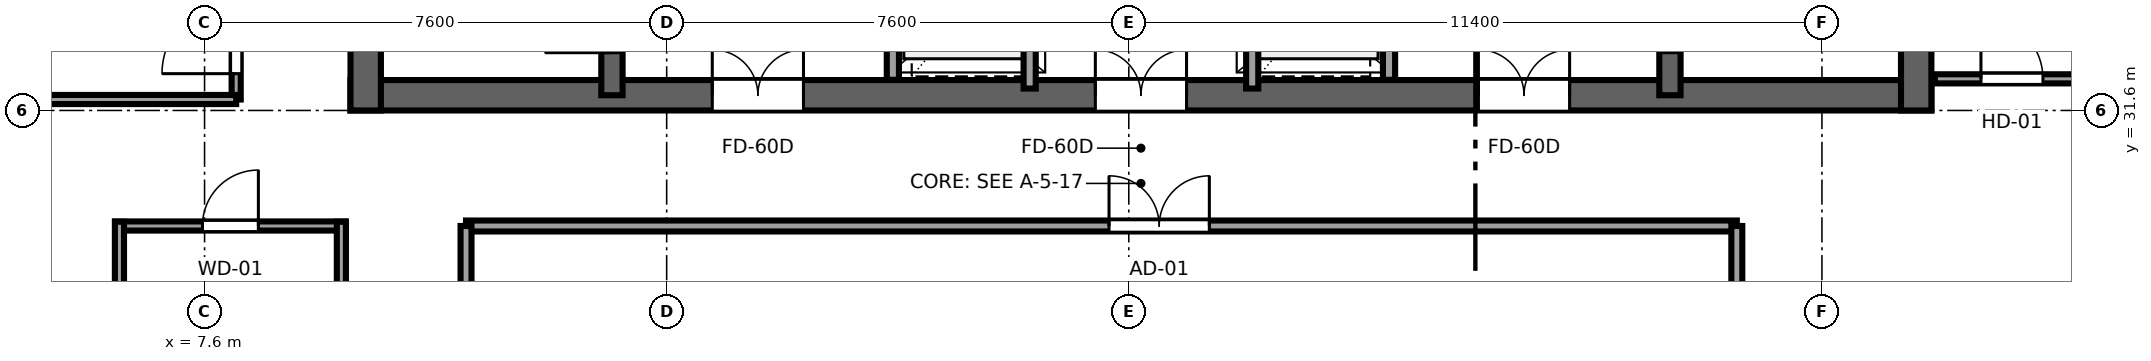
"""IFC4 building model, lengths in metres.
Left out: names, types, materials, properties, quantities, classifications, styles, units other than length and angle.
Written with IfcOpenShell. Run it as: python <this file> out.ifc"""

import sys

from ifc_helpers import new_model, si_unit, direction, frame, frame_2d, origin, place, context, subcontext, project, spatial, rectangle, extrude, source, transform, mapped, element, fill, save


model = new_model("IFC4")
c1 = context("Model", 3, precision=1e-05, world=origin(), true_north=direction((0.0, 1.0)))
c2 = subcontext(c1, "Body", "Model", "MODEL_VIEW")
j1 = project(units=[si_unit("LENGTHUNIT", "METRE"), si_unit("PLANEANGLEUNIT", "RADIAN")], contexts=[c1])
p1 = place(None, origin())
s1 = spatial("IfcSite", under=j1, at=p1, CompositionType="ELEMENT")
p2 = place(p1, origin())
s2 = spatial("IfcBuilding", under=s1, at=p2, CompositionType="ELEMENT")
p3 = place(p2, frame((0.0, 0.0, 266.5)))
s3 = spatial("IfcBuildingStorey", under=s2, at=p3, CompositionType="ELEMENT", Elevation=266.5)
p4 = place(p3, frame((10.0, 31.85, 0.0), z_axis=(0.0, 0.0, 1.0), x_axis=(1.0, 0.0, 0.0)))
e1 = element("IfcWall", 1, at=p4, inside=s3, PredefinedType="SHEAR", context=c2, shape_type="SweptSolid", body=[
    extrude(rectangle(XDim=26.0, YDim=0.5, at=frame_2d((13.0, 0.0))), origin(), (0.0, 0.0, 1.0), 3.55),
])
p5 = place(p4, frame((7.45, 0.0, 0.0), z_axis=(0.0, 0.0, 1.0), x_axis=(-1.0, 0.0, 0.0)))
e2 = element("IfcOpeningElement", 2, at=p5, cuts=e1, PredefinedType="OPENING", context=c2, shape_type="SweptSolid", body=[
    extrude(rectangle(XDim=1.5, YDim=2.04, at=frame_2d((0.75, 1.02))), frame((0.0, 0.26, 0.0), z_axis=(0.0, -1.0, 0.0), x_axis=(1.0, 0.0, 0.0)), (0.0, 0.0, 1.0), 0.52),
])
p6 = place(p4, frame((13.75, 0.0, 0.0), z_axis=(0.0, 0.0, 1.0), x_axis=(-1.0, 0.0, 0.0)))
e3 = element("IfcOpeningElement", 3, at=p6, cuts=e1, PredefinedType="OPENING", context=c2, shape_type="SweptSolid", body=[
    extrude(rectangle(XDim=1.5, YDim=2.04, at=frame_2d((0.75, 1.02))), frame((0.0, 0.26, 0.0), z_axis=(0.0, -1.0, 0.0), x_axis=(1.0, 0.0, 0.0)), (0.0, 0.0, 1.0), 0.52),
])
p7 = place(p4, frame((20.05, 0.0, 0.0), z_axis=(0.0, 0.0, 1.0), x_axis=(-1.0, 0.0, 0.0)))
e4 = element("IfcOpeningElement", 4, at=p7, cuts=e1, PredefinedType="OPENING", context=c2, shape_type="SweptSolid", body=[
    extrude(rectangle(XDim=1.5, YDim=2.04, at=frame_2d((0.75, 1.02))), frame((0.0, 0.26, 0.0), z_axis=(0.0, -1.0, 0.0), x_axis=(1.0, 0.0, 0.0)), (0.0, 0.0, 1.0), 0.52),
])
for number, where, z_axis, x_axis in (
    (5, (10.25, 31.6, 0.0), (0.0, 0.0, 1.0), (0.0, 1.0, 0.0)),
    (6, (35.75, 31.6, 0.0), (0.0, 0.0, 1.0), (0.0, 1.0, 0.0)),
):
    element("IfcWall", number, at=place(p3, frame(where, z_axis=z_axis, x_axis=x_axis)), inside=s3, PredefinedType="SHEAR", context=c2, shape_type="SweptSolid", body=[
        extrude(rectangle(XDim=13.6, YDim=0.5, at=frame_2d((6.8, 0.0))), origin(), (0.0, 0.0, 1.0), 3.55),
    ])
p8 = place(p3, frame((14.3, 31.85, 0.0), z_axis=(0.0, 0.0, 1.0), x_axis=(0.0, 1.0, 0.0)))
e7 = element("IfcWall", 7, at=p8, inside=s3, PredefinedType="SHEAR", context=c2, shape_type="SweptSolid", body=[
    extrude(rectangle(XDim=13.1, YDim=0.35, at=frame_2d((6.55, 0.0))), origin(), (0.0, 0.0, 1.0), 3.55),
])
p9 = place(p8, frame((0.7, 0.0, 0.0)))
e8 = element("IfcOpeningElement", 8, at=p9, cuts=e7, PredefinedType="OPENING", context=c2, shape_type="SweptSolid", body=[
    extrude(rectangle(XDim=1.1, YDim=2.12, at=frame_2d((0.55, 1.06))), frame((0.0, 0.185, 0.0), z_axis=(0.0, -1.0, 0.0), x_axis=(1.0, 0.0, 0.0)), (0.0, 0.0, 1.0), 0.37),
])
p10 = place(p3, frame((31.7, 31.85, 0.0), z_axis=(0.0, 0.0, 1.0), x_axis=(0.0, 1.0, 0.0)))
e9 = element("IfcWall", 9, at=p10, inside=s3, PredefinedType="SHEAR", context=c2, shape_type="SweptSolid", body=[
    extrude(rectangle(XDim=13.1, YDim=0.35, at=frame_2d((6.55, 0.0))), origin(), (0.0, 0.0, 1.0), 3.55),
])
p11 = place(p10, frame((1.8, 0.0, 0.0), z_axis=(0.0, 0.0, 1.0), x_axis=(-1.0, 0.0, 0.0)))
e10 = element("IfcOpeningElement", 10, at=p11, cuts=e9, PredefinedType="OPENING", context=c2, shape_type="SweptSolid", body=[
    extrude(rectangle(XDim=1.1, YDim=2.12, at=frame_2d((0.55, 1.06))), frame((0.0, 0.185, 0.0), z_axis=(0.0, -1.0, 0.0), x_axis=(1.0, 0.0, 0.0)), (0.0, 0.0, 1.0), 0.37),
])
for number, where, z_axis, x_axis in (
    (11, (18.92, 32.104, 0.0), (0.0, 0.0, 1.0), (0.0, 1.0, 0.0)),
    (12, (27.08, 32.104, 0.0), (0.0, 0.0, 1.0), (0.0, 1.0, 0.0)),
):
    element("IfcWall", number, at=place(p3, frame(where, z_axis=z_axis, x_axis=x_axis)), inside=s3, PredefinedType="SOLIDWALL", context=c2, shape_type="SweptSolid", body=[
        extrude(rectangle(XDim=4.046, YDim=0.2, at=frame_2d((2.023, 0.0))), origin(), (0.0, 0.0, 1.0), 3.25),
    ])
p12 = place(p3, frame((21.17, 31.96, 0.0), z_axis=(0.0, 0.0, 1.0), x_axis=(0.0, 1.0, 0.0)))
e13 = element("IfcWall", 13, at=p12, inside=s3, PredefinedType="SOLIDWALL", context=c2, shape_type="SweptSolid", body=[
    extrude(rectangle(XDim=5.08, YDim=0.2, at=frame_2d((2.54, 0.0))), origin(), (0.0, 0.0, 1.0), 3.25),
])
p13 = place(p12, frame((0.74, 0.0, 0.0)))
e14 = element("IfcOpeningElement", 14, at=p13, cuts=e13, PredefinedType="OPENING", context=c2, shape_type="SweptSolid", body=[
    extrude(rectangle(XDim=1.1, YDim=2.12, at=frame_2d((0.55, 1.06))), frame((0.0, 0.11, 0.0), z_axis=(0.0, -1.0, 0.0), x_axis=(1.0, 0.0, 0.0)), (0.0, 0.0, 1.0), 0.22),
])
p14 = place(p12, frame((3.24, 0.0, 0.0)))
e15 = element("IfcOpeningElement", 15, at=p14, cuts=e13, PredefinedType="OPENING", context=c2, shape_type="SweptSolid", body=[
    extrude(rectangle(XDim=1.1, YDim=2.12, at=frame_2d((0.55, 1.06))), frame((0.0, 0.11, 0.0), z_axis=(0.0, -1.0, 0.0), x_axis=(1.0, 0.0, 0.0)), (0.0, 0.0, 1.0), 0.22),
])
p15 = place(p3, frame((24.83, 31.96, 0.0), z_axis=(0.0, 0.0, 1.0), x_axis=(0.0, 1.0, 0.0)))
e16 = element("IfcWall", 16, at=p15, inside=s3, PredefinedType="SOLIDWALL", context=c2, shape_type="SweptSolid", body=[
    extrude(rectangle(XDim=5.08, YDim=0.2, at=frame_2d((2.54, 0.0))), origin(), (0.0, 0.0, 1.0), 3.25),
])
p16 = place(p15, frame((0.74, 0.0, 0.0)))
e17 = element("IfcOpeningElement", 17, at=p16, cuts=e16, PredefinedType="OPENING", context=c2, shape_type="SweptSolid", body=[
    extrude(rectangle(XDim=1.1, YDim=2.12, at=frame_2d((0.55, 1.06))), frame((0.0, 0.11, 0.0), z_axis=(0.0, -1.0, 0.0), x_axis=(1.0, 0.0, 0.0)), (0.0, 0.0, 1.0), 0.22),
])
p17 = place(p15, frame((3.24, 0.0, 0.0)))
e18 = element("IfcOpeningElement", 18, at=p17, cuts=e16, PredefinedType="OPENING", context=c2, shape_type="SweptSolid", body=[
    extrude(rectangle(XDim=1.1, YDim=2.12, at=frame_2d((0.55, 1.06))), frame((0.0, 0.11, 0.0), z_axis=(0.0, -1.0, 0.0), x_axis=(1.0, 0.0, 0.0)), (0.0, 0.0, 1.0), 0.22),
])
p18 = place(p3, frame((11.9, 29.7, 0.0), z_axis=(0.0, 0.0, 1.0), x_axis=(1.0, 0.0, 0.0)))
e19 = element("IfcWall", 19, at=p18, inside=s3, PredefinedType="PARTITIONING", context=c2, shape_type="SweptSolid", body=[
    extrude(rectangle(XDim=20.9, YDim=0.18, at=frame_2d((10.45, 0.0))), origin(), (0.0, 0.0, 1.0), 3.25),
])
p19 = place(p18, frame((10.575, 0.0, 0.0)))
e20 = element("IfcOpeningElement", 20, at=p19, cuts=e19, PredefinedType="OPENING", context=c2, shape_type="SweptSolid", body=[
    extrude(rectangle(XDim=1.65, YDim=2.15, at=frame_2d((0.825, 1.075))), frame((0.0, 0.1, 0.0), z_axis=(0.0, -1.0, 0.0), x_axis=(1.0, 0.0, 0.0)), (0.0, 0.0, 1.0), 0.2),
])
p20 = place(p3, frame((11.9, 26.2, 0.0), z_axis=(0.0, 0.0, 1.0), x_axis=(0.0, 1.0, 0.0)))
e21 = element("IfcWall", 21, at=p20, inside=s3, PredefinedType="PARTITIONING", context=c2, shape_type="SweptSolid", body=[
    extrude(rectangle(XDim=3.5, YDim=0.18, at=frame_2d((1.75, 0.0))), origin(), (0.0, 0.0, 1.0), 3.25),
])
p21 = place(p3, frame((32.8, 26.2, 0.0), z_axis=(0.0, 0.0, 1.0), x_axis=(0.0, 1.0, 0.0)))
e22 = element("IfcWall", 22, at=p21, inside=s3, PredefinedType="PARTITIONING", context=c2, shape_type="SweptSolid", body=[
    extrude(rectangle(XDim=3.5, YDim=0.18, at=frame_2d((1.75, 0.0))), origin(), (0.0, 0.0, 1.0), 2.04),
])
p22 = place(p3, frame((6.13, 29.7, 0.0), z_axis=(0.0, 0.0, 1.0), x_axis=(1.0, 0.0, 0.0)))
e23 = element("IfcWall", 23, at=p22, inside=s3, PredefinedType="PARTITIONING", context=c2, shape_type="SweptSolid", body=[
    extrude(rectangle(XDim=3.79, YDim=0.15, at=frame_2d((1.895, 0.0))), origin(), (0.0, 0.0, 1.0), 3.25),
])
p23 = place(p22, frame((1.435, 0.0, 0.0)))
e24 = element("IfcOpeningElement", 24, at=p23, cuts=e23, PredefinedType="OPENING", context=c2, shape_type="SweptSolid", body=[
    extrude(rectangle(XDim=0.92, YDim=2.01, at=frame_2d((0.46, 1.005))), frame((0.0, 0.085, 0.0), z_axis=(0.0, -1.0, 0.0), x_axis=(1.0, 0.0, 0.0)), (0.0, 0.0, 1.0), 0.17),
])
for number, where, z_axis, x_axis in (
    (25, (6.2, 26.43, 0.0), (0.0, 0.0, 1.0), (0.0, 1.0, 0.0)),
    (26, (9.85, 26.43, 0.0), (0.0, 0.0, 1.0), (0.0, 1.0, 0.0)),
):
    element("IfcWall", number, at=place(p3, frame(where, z_axis=z_axis, x_axis=x_axis)), inside=s3, PredefinedType="PARTITIONING", context=c2, shape_type="SweptSolid", body=[
        extrude(rectangle(XDim=3.34, YDim=0.15, at=frame_2d((1.67, 0.0))), origin(), (0.0, 0.0, 1.0), 3.25),
    ])
p24 = place(p3, frame((8.12, 31.78, 0.0), z_axis=(0.0, 0.0, 1.0), x_axis=(0.0, 1.0, 0.0)))
e27 = element("IfcWall", 27, at=p24, inside=s3, PredefinedType="PARTITIONING", context=c2, shape_type="SweptSolid", body=[
    extrude(rectangle(XDim=4.01, YDim=0.15, at=frame_2d((2.005, 0.0))), origin(), (0.0, 0.0, 1.0), 3.25),
])
p25 = place(p24, frame((0.425, 0.0, 0.0)))
e28 = element("IfcOpeningElement", 28, at=p25, cuts=e27, PredefinedType="OPENING", context=c2, shape_type="SweptSolid", body=[
    extrude(rectangle(XDim=1.22, YDim=2.08, at=frame_2d((0.61, 1.04))), frame((0.0, 0.085, 0.0), z_axis=(0.0, -1.0, 0.0), x_axis=(1.0, 0.0, 0.0)), (0.0, 0.0, 1.0), 0.17),
])
p26 = place(p3, frame((3.005, 31.78, 0.0), z_axis=(0.0, 0.0, 1.0), x_axis=(1.0, 0.0, 0.0)))
e29 = element("IfcWall", 29, at=p26, inside=s3, PredefinedType="PARTITIONING", context=c2, shape_type="SweptSolid", body=[
    extrude(rectangle(XDim=5.115, YDim=0.15, at=frame_2d((2.558, 0.0))), origin(), (0.0, 0.0, 1.0), 3.25),
])
p27 = place(p3, frame((36.055, 32.12, 0.0), z_axis=(0.0, 0.0, 1.0), x_axis=(1.0, 0.0, 0.0)))
e30 = element("IfcWall", 30, at=p27, inside=s3, PredefinedType="PARTITIONING", context=c2, shape_type="SweptSolid", body=[
    extrude(rectangle(XDim=2.54, YDim=0.15, at=frame_2d((1.27, 0.0))), origin(), (0.0, 0.0, 1.0), 3.25),
])
p28 = place(p27, frame((0.76, 0.0, 0.0)))
e31 = element("IfcOpeningElement", 31, at=p28, cuts=e30, PredefinedType="OPENING", context=c2, shape_type="SweptSolid", body=[
    extrude(rectangle(XDim=1.02, YDim=2.03, at=frame_2d((0.51, 1.015))), frame((0.0, 0.085, 0.0), z_axis=(0.0, -1.0, 0.0), x_axis=(1.0, 0.0, 0.0)), (0.0, 0.0, 1.0), 0.17),
])
m1 = source(origin(), c2, "Body", "SweptSolid", [
    extrude(rectangle(XDim=1.1, YDim=2.12, at=frame_2d((0.55, 1.06))), frame((0.0, 0.025, 0.0), z_axis=(0.0, -1.0, 0.0), x_axis=(1.0, 0.0, 0.0)), (0.0, 0.0, 1.0), 0.05),
])
p29 = place(p9, origin())
e32 = element("IfcDoor", 32, at=p29, inside=s3, OperationType="SINGLE_SWING_LEFT", PredefinedType="DOOR", context=c2, shape_type="MappedRepresentation", body=[
    mapped(m1, transform((0.0, 0.0, 0.0), x_axis=(1.0, 0.0, 0.0), y_axis=(0.0, 1.0, 0.0), z_axis=(0.0, 0.0, 1.0), scale=1.0)),
])
fill(e8, e32)
p30 = place(p11, origin())
e33 = element("IfcDoor", 33, at=p30, inside=s3, OperationType="SINGLE_SWING_RIGHT", PredefinedType="DOOR", context=c2, shape_type="MappedRepresentation", body=[
    mapped(m1, transform((0.0, 0.0, 0.0), x_axis=(1.0, 0.0, 0.0), y_axis=(0.0, 1.0, 0.0), z_axis=(0.0, 0.0, 1.0), scale=1.0)),
])
fill(e10, e33)
m2 = source(origin(), c2, "Body", "SweptSolid", [
    extrude(rectangle(XDim=1.5, YDim=2.04, at=frame_2d((0.75, 1.02))), frame((0.0, 0.025, 0.0), z_axis=(0.0, -1.0, 0.0), x_axis=(1.0, 0.0, 0.0)), (0.0, 0.0, 1.0), 0.05),
])
p31 = place(p5, origin())
e34 = element("IfcDoor", 34, at=p31, inside=s3, OperationType="DOUBLE_DOOR_SINGLE_SWING", PredefinedType="DOOR", context=c2, shape_type="MappedRepresentation", body=[
    mapped(m2, transform((0.0, 0.0, 0.0), x_axis=(1.0, 0.0, 0.0), y_axis=(0.0, 1.0, 0.0), z_axis=(0.0, 0.0, 1.0), scale=1.0)),
])
fill(e2, e34)
p32 = place(p6, origin())
e35 = element("IfcDoor", 35, at=p32, inside=s3, OperationType="DOUBLE_DOOR_SINGLE_SWING", PredefinedType="DOOR", context=c2, shape_type="MappedRepresentation", body=[
    mapped(m2, transform((0.0, 0.0, 0.0), x_axis=(1.0, 0.0, 0.0), y_axis=(0.0, 1.0, 0.0), z_axis=(0.0, 0.0, 1.0), scale=1.0)),
])
fill(e3, e35)
p33 = place(p7, origin())
e36 = element("IfcDoor", 36, at=p33, inside=s3, OperationType="DOUBLE_DOOR_SINGLE_SWING", PredefinedType="DOOR", context=c2, shape_type="MappedRepresentation", body=[
    mapped(m2, transform((0.0, 0.0, 0.0), x_axis=(1.0, 0.0, 0.0), y_axis=(0.0, 1.0, 0.0), z_axis=(0.0, 0.0, 1.0), scale=1.0)),
])
fill(e4, e36)
m3 = source(origin(), c2, "Body", "SweptSolid", [
    extrude(rectangle(XDim=1.65, YDim=2.15, at=frame_2d((0.825, 1.075))), frame((0.0, 0.025, 0.0), z_axis=(0.0, -1.0, 0.0), x_axis=(1.0, 0.0, 0.0)), (0.0, 0.0, 1.0), 0.05),
])
p34 = place(p19, origin())
e37 = element("IfcDoor", 37, at=p34, inside=s3, OperationType="DOUBLE_DOOR_SINGLE_SWING", PredefinedType="DOOR", context=c2, shape_type="MappedRepresentation", body=[
    mapped(m3, transform((0.0, 0.0, 0.0), x_axis=(1.0, 0.0, 0.0), y_axis=(0.0, 1.0, 0.0), z_axis=(0.0, 0.0, 1.0), scale=1.0)),
])
fill(e20, e37)
m4 = source(origin(), c2, "Body", "SweptSolid", [
    extrude(rectangle(XDim=0.92, YDim=2.01, at=frame_2d((0.46, 1.005))), frame((0.0, 0.025, 0.0), z_axis=(0.0, -1.0, 0.0), x_axis=(1.0, 0.0, 0.0)), (0.0, 0.0, 1.0), 0.05),
])
p35 = place(p23, origin())
e38 = element("IfcDoor", 38, at=p35, inside=s3, OperationType="SINGLE_SWING_RIGHT", PredefinedType="DOOR", context=c2, shape_type="MappedRepresentation", body=[
    mapped(m4, transform((0.0, 0.0, 0.0), x_axis=(1.0, 0.0, 0.0), y_axis=(0.0, 1.0, 0.0), z_axis=(0.0, 0.0, 1.0), scale=1.0)),
])
fill(e24, e38)
m5 = source(origin(), c2, "Body", "SweptSolid", [
    extrude(rectangle(XDim=1.22, YDim=2.08, at=frame_2d((0.61, 1.04))), frame((0.0, 0.025, 0.0), z_axis=(0.0, -1.0, 0.0), x_axis=(1.0, 0.0, 0.0)), (0.0, 0.0, 1.0), 0.05),
])
p36 = place(p25, origin())
e39 = element("IfcDoor", 39, at=p36, inside=s3, OperationType="SINGLE_SWING_LEFT", PredefinedType="DOOR", context=c2, shape_type="MappedRepresentation", body=[
    mapped(m5, transform((0.0, 0.0, 0.0), x_axis=(1.0, 0.0, 0.0), y_axis=(0.0, 1.0, 0.0), z_axis=(0.0, 0.0, 1.0), scale=1.0)),
])
fill(e28, e39)
m6 = source(origin(), c2, "Body", "SweptSolid", [
    extrude(rectangle(XDim=1.02, YDim=2.03, at=frame_2d((0.51, 1.015))), frame((0.0, 0.025, 0.0), z_axis=(0.0, -1.0, 0.0), x_axis=(1.0, 0.0, 0.0)), (0.0, 0.0, 1.0), 0.05),
])
p37 = place(p28, origin())
e40 = element("IfcDoor", 40, at=p37, inside=s3, OperationType="SINGLE_SWING_LEFT", PredefinedType="DOOR", context=c2, shape_type="MappedRepresentation", body=[
    mapped(m6, transform((0.0, 0.0, 0.0), x_axis=(1.0, 0.0, 0.0), y_axis=(0.0, 1.0, 0.0), z_axis=(0.0, 0.0, 1.0), scale=1.0)),
])
fill(e31, e40)
save(model, sys.argv[1])
